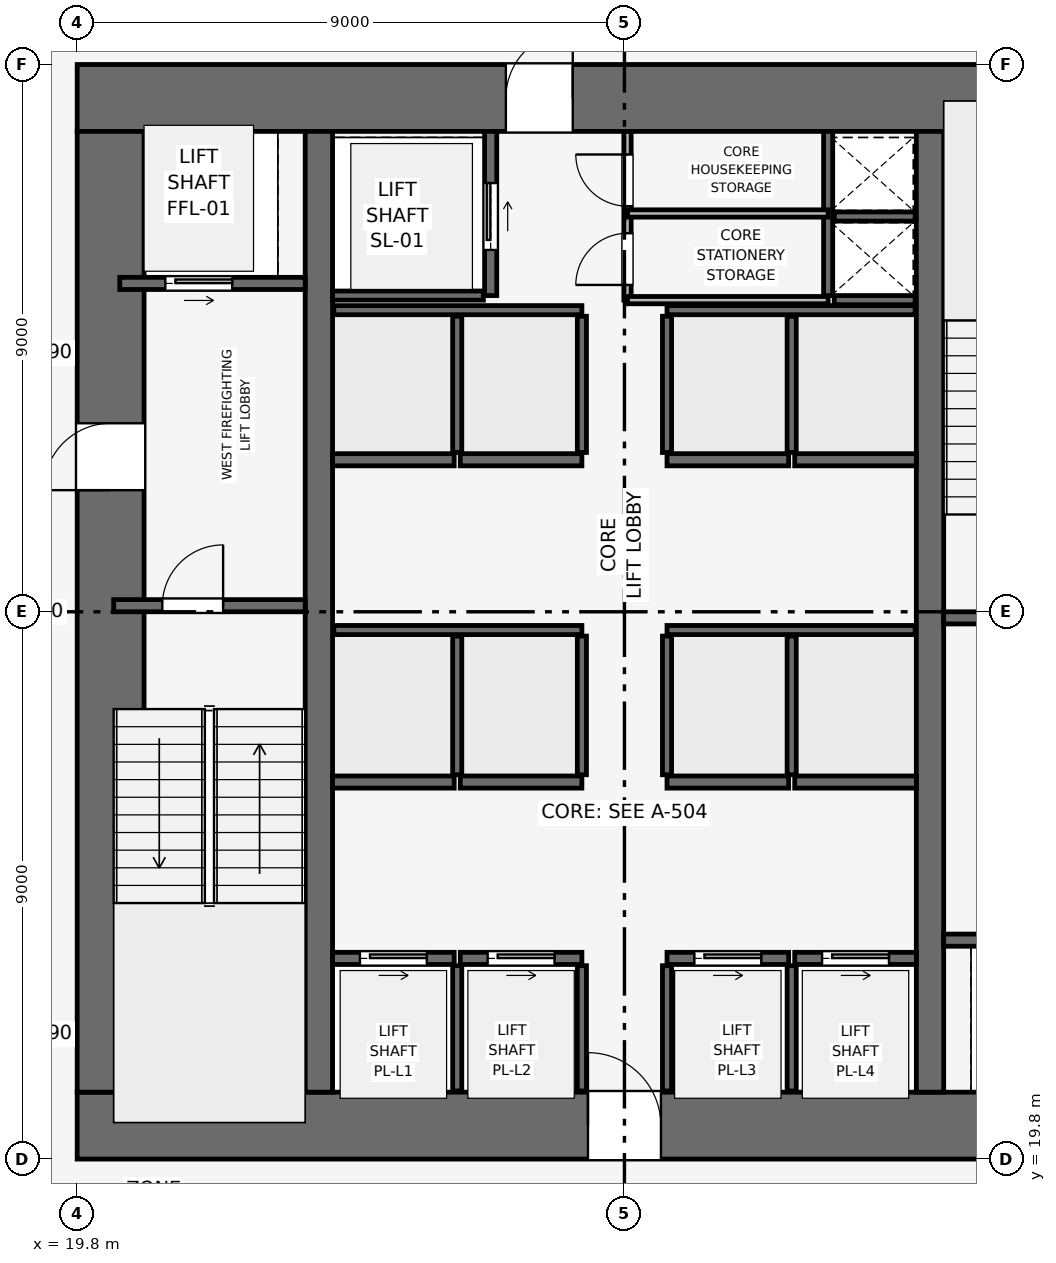
"""IFC4 building model, lengths in metres.
Left out: names, types, materials, properties, quantities, classifications, styles, units other than length and angle.
Written with IfcOpenShell. Run it as: python <this file> out.ifc"""

import sys

from ifc_helpers import new_model, si_unit, direction, frame, frame_2d, origin, place, context, subcontext, project, spatial, rectangle, extrude, element, fill, save


model = new_model("IFC4")
c1 = context("Model", 3, precision=1e-05, world=origin(), true_north=direction((0.0, 1.0)))
c2 = subcontext(c1, "Body", "Model", "MODEL_VIEW")
j1 = project(units=[si_unit("LENGTHUNIT", "METRE"), si_unit("PLANEANGLEUNIT", "RADIAN")], contexts=[c1])
p1 = place(None, origin())
s1 = spatial("IfcSite", under=j1, at=p1, CompositionType="ELEMENT")
p2 = place(p1, origin())
s2 = spatial("IfcBuilding", under=s1, at=p2, CompositionType="ELEMENT")
p3 = place(p2, frame((0.0, 0.0, 33.9)))
s3 = spatial("IfcBuildingStorey", under=s2, at=p3, CompositionType="ELEMENT", Elevation=33.9)
p4 = place(p3, frame((19.8, 20.35, 0.0), z_axis=(0.0, 0.0, 1.0), x_axis=(1.0, 0.0, 0.0)))
e1 = element("IfcWall", 1, at=p4, inside=s3, PredefinedType="SHEAR", context=c2, shape_type="SweptSolid", body=[
    extrude(rectangle(XDim=18.0, YDim=1.1, at=frame_2d((9.0, 0.0))), origin(), (0.0, 0.0, 1.0), 3.9),
])
p5 = place(p4, frame((8.4, 0.0, 0.0)))
e2 = element("IfcOpeningElement", 2, at=p5, cuts=e1, PredefinedType="OPENING", context=c2, shape_type="SweptSolid", body=[
    extrude(rectangle(XDim=1.2, YDim=2.2, at=frame_2d((0.6, 1.1))), frame((0.0, 0.56, 0.0), z_axis=(0.0, -1.0, 0.0), x_axis=(1.0, 0.0, 0.0)), (0.0, 0.0, 1.0), 1.12),
])
p6 = place(p3, frame((19.8, 37.25, 0.0), z_axis=(0.0, 0.0, 1.0), x_axis=(1.0, 0.0, 0.0)))
e3 = element("IfcWall", 3, at=p6, inside=s3, PredefinedType="SHEAR", context=c2, shape_type="SweptSolid", body=[
    extrude(rectangle(XDim=18.0, YDim=1.1, at=frame_2d((9.0, 0.0))), origin(), (0.0, 0.0, 1.0), 3.9),
])
p7 = place(p6, frame((7.05, 0.0, 0.0)))
e4 = element("IfcOpeningElement", 4, at=p7, cuts=e3, PredefinedType="OPENING", context=c2, shape_type="SweptSolid", body=[
    extrude(rectangle(XDim=1.1, YDim=2.15, at=frame_2d((0.55, 1.075))), frame((0.0, 0.56, 0.0), z_axis=(0.0, -1.0, 0.0), x_axis=(1.0, 0.0, 0.0)), (0.0, 0.0, 1.0), 1.12),
])
p8 = place(p3, frame((20.35, 20.9, 0.0), z_axis=(0.0, 0.0, 1.0), x_axis=(0.0, 1.0, 0.0)))
e5 = element("IfcWall", 5, at=p8, inside=s3, PredefinedType="SHEAR", context=c2, shape_type="SweptSolid", body=[
    extrude(rectangle(XDim=15.8, YDim=1.1, at=frame_2d((7.9, 0.0))), origin(), (0.0, 0.0, 1.0), 3.9),
])
p9 = place(p8, frame((9.9, 0.0, 0.0)))
e6 = element("IfcOpeningElement", 6, at=p9, cuts=e5, PredefinedType="OPENING", context=c2, shape_type="SweptSolid", body=[
    extrude(rectangle(XDim=1.1, YDim=2.15, at=frame_2d((0.55, 1.075))), frame((0.0, 0.56, 0.0), z_axis=(0.0, -1.0, 0.0), x_axis=(1.0, 0.0, 0.0)), (0.0, 0.0, 1.0), 1.12),
])
for number, where, z_axis, x_axis in (
    (7, (23.775, 20.9, 0.0), (0.0, 0.0, 1.0), (0.0, 1.0, 0.0)),
    (8, (33.825, 20.9, 0.0), (0.0, 0.0, 1.0), (0.0, 1.0, 0.0)),
):
    element("IfcWall", number, at=place(p3, frame(where, z_axis=z_axis, x_axis=x_axis)), inside=s3, PredefinedType="SHEAR", context=c2, shape_type="SweptSolid", body=[
        extrude(rectangle(XDim=15.8, YDim=0.45, at=frame_2d((7.9, 0.0))), origin(), (0.0, 0.0, 1.0), 3.9),
    ])
p10 = place(p3, frame((20.4, 28.9, 0.0), z_axis=(0.0, 0.0, 1.0), x_axis=(1.0, 0.0, 0.0)))
e9 = element("IfcWall", 9, at=p10, inside=s3, PredefinedType="SHEAR", context=c2, shape_type="SweptSolid", body=[
    extrude(rectangle(XDim=3.15, YDim=0.2, at=frame_2d((1.575, 0.0))), origin(), (0.0, 0.0, 1.0), 3.65),
])
p11 = place(p10, frame((0.8, 0.0, 0.0)))
e10 = element("IfcOpeningElement", 10, at=p11, cuts=e9, PredefinedType="OPENING", context=c2, shape_type="SweptSolid", body=[
    extrude(rectangle(XDim=1.0, YDim=2.1, at=frame_2d((0.5, 1.05))), frame((0.0, 0.11, 0.0), z_axis=(0.0, -1.0, 0.0), x_axis=(1.0, 0.0, 0.0)), (0.0, 0.0, 1.0), 0.22),
])
p12 = place(p3, frame((34.05, 28.7, 0.0), z_axis=(0.0, 0.0, 1.0), x_axis=(1.0, 0.0, 0.0)))
e11 = element("IfcWall", 11, at=p12, inside=s3, PredefinedType="SHEAR", context=c2, shape_type="SweptSolid", body=[
    extrude(rectangle(XDim=3.15, YDim=0.2, at=frame_2d((1.575, 0.0))), origin(), (0.0, 0.0, 1.0), 3.65),
])
p13 = place(p12, frame((0.8, 0.0, 0.0)))
e12 = element("IfcOpeningElement", 12, at=p13, cuts=e11, PredefinedType="OPENING", context=c2, shape_type="SweptSolid", body=[
    extrude(rectangle(XDim=1.0, YDim=2.1, at=frame_2d((0.5, 1.05))), frame((0.0, 0.11, 0.0), z_axis=(0.0, -1.0, 0.0), x_axis=(1.0, 0.0, 0.0)), (0.0, 0.0, 1.0), 0.22),
])
p14 = place(p3, frame((32.15, 34.0, 0.0), z_axis=(0.0, 0.0, 1.0), x_axis=(0.0, 1.0, 0.0)))
e13 = element("IfcWall", 13, at=p14, inside=s3, PredefinedType="SHEAR", context=c2, shape_type="SweptSolid", body=[
    extrude(rectangle(XDim=2.7, YDim=0.15, at=frame_2d((1.35, 0.0))), origin(), (0.0, 0.0, 1.0), 3.65),
])
for number, where, z_axis, x_axis in (
    (14, (32.25, 33.925, 0.0), (0.0, 0.0, 1.0), (1.0, 0.0, 0.0)),
    (15, (32.25, 35.3, 0.0), (0.0, 0.0, 1.0), (1.0, 0.0, 0.0)),
):
    element("IfcWall", number, at=place(p3, frame(where, z_axis=z_axis, x_axis=x_axis)), inside=s3, PredefinedType="SHEAR", context=c2, shape_type="SweptSolid", body=[
        extrude(rectangle(XDim=1.33, YDim=0.15, at=frame_2d((0.665, 0.0))), origin(), (0.0, 0.0, 1.0), 3.65),
    ])
p15 = place(p3, frame((20.5, 34.2, 0.0), z_axis=(0.0, 0.0, 1.0), x_axis=(1.0, 0.0, 0.0)))
e16 = element("IfcWall", 16, at=p15, inside=s3, PredefinedType="SHEAR", context=c2, shape_type="SweptSolid", body=[
    extrude(rectangle(XDim=3.05, YDim=0.2, at=frame_2d((1.525, 0.0))), origin(), (0.0, 0.0, 1.0), 3.65),
])
p16 = place(p15, frame((0.75, 0.0, 0.0)))
e17 = element("IfcOpeningElement", 17, at=p16, cuts=e16, PredefinedType="OPENING", context=c2, shape_type="SweptSolid", body=[
    extrude(rectangle(XDim=1.1, YDim=2.15, at=frame_2d((0.55, 1.075))), frame((0.0, 0.11, 0.0), z_axis=(0.0, -1.0, 0.0), x_axis=(1.0, 0.0, 0.0)), (0.0, 0.0, 1.0), 0.22),
])
p17 = place(p3, frame((34.05, 23.4, 0.0), z_axis=(0.0, 0.0, 1.0), x_axis=(1.0, 0.0, 0.0)))
e18 = element("IfcWall", 18, at=p17, inside=s3, PredefinedType="SHEAR", context=c2, shape_type="SweptSolid", body=[
    extrude(rectangle(XDim=3.05, YDim=0.2, at=frame_2d((1.525, 0.0))), origin(), (0.0, 0.0, 1.0), 3.65),
])
p18 = place(p17, frame((1.2, 0.0, 0.0)))
e19 = element("IfcOpeningElement", 19, at=p18, cuts=e18, PredefinedType="OPENING", context=c2, shape_type="SweptSolid", body=[
    extrude(rectangle(XDim=1.1, YDim=2.15, at=frame_2d((0.55, 1.075))), frame((0.0, 0.11, 0.0), z_axis=(0.0, -1.0, 0.0), x_axis=(1.0, 0.0, 0.0)), (0.0, 0.0, 1.0), 0.22),
])
p19 = place(p3, frame((26.6, 34.0, 0.0), z_axis=(0.0, 0.0, 1.0), x_axis=(0.0, 1.0, 0.0)))
e20 = element("IfcWall", 20, at=p19, inside=s3, PredefinedType="SHEAR", context=c2, shape_type="SweptSolid", body=[
    extrude(rectangle(XDim=2.7, YDim=0.2, at=frame_2d((1.35, 0.0))), origin(), (0.0, 0.0, 1.0), 3.65),
])
p20 = place(p19, frame((0.75, 0.0, 0.0)))
e21 = element("IfcOpeningElement", 21, at=p20, cuts=e20, PredefinedType="OPENING", context=c2, shape_type="SweptSolid", body=[
    extrude(rectangle(XDim=1.1, YDim=2.15, at=frame_2d((0.55, 1.075))), frame((0.0, 0.11, 0.0), z_axis=(0.0, -1.0, 0.0), x_axis=(1.0, 0.0, 0.0)), (0.0, 0.0, 1.0), 0.22),
])
p21 = place(p3, frame((24.0, 34.0, 0.0), z_axis=(0.0, 0.0, 1.0), x_axis=(1.0, 0.0, 0.0)))
e22 = element("IfcWall", 22, at=p21, inside=s3, PredefinedType="SHEAR", context=c2, shape_type="SweptSolid", body=[
    extrude(rectangle(XDim=2.48, YDim=0.15, at=frame_2d((1.24, 0.0))), origin(), (0.0, 0.0, 1.0), 3.65),
])
p22 = place(p3, frame((24.0, 23.1, 0.0), z_axis=(0.0, 0.0, 1.0), x_axis=(1.0, 0.0, 0.0)))
e23 = element("IfcWall", 23, at=p22, inside=s3, PredefinedType="SHEAR", context=c2, shape_type="SweptSolid", body=[
    extrude(rectangle(XDim=2.0, YDim=0.2, at=frame_2d((1.0, 0.0))), origin(), (0.0, 0.0, 1.0), 3.65),
])
p23 = place(p22, frame((0.45, 0.0, 0.0)))
e24 = element("IfcOpeningElement", 24, at=p23, cuts=e23, PredefinedType="OPENING", context=c2, shape_type="SweptSolid", body=[
    extrude(rectangle(XDim=1.1, YDim=2.15, at=frame_2d((0.55, 1.075))), frame((0.0, 0.11, 0.0), z_axis=(0.0, -1.0, 0.0), x_axis=(1.0, 0.0, 0.0)), (0.0, 0.0, 1.0), 0.22),
])
p24 = place(p3, frame((26.1, 23.1, 0.0), z_axis=(0.0, 0.0, 1.0), x_axis=(1.0, 0.0, 0.0)))
e25 = element("IfcWall", 25, at=p24, inside=s3, PredefinedType="SHEAR", context=c2, shape_type="SweptSolid", body=[
    extrude(rectangle(XDim=2.0, YDim=0.2, at=frame_2d((1.0, 0.0))), origin(), (0.0, 0.0, 1.0), 3.65),
])
p25 = place(p24, frame((0.45, 0.0, 0.0)))
e26 = element("IfcOpeningElement", 26, at=p25, cuts=e25, PredefinedType="OPENING", context=c2, shape_type="SweptSolid", body=[
    extrude(rectangle(XDim=1.1, YDim=2.15, at=frame_2d((0.55, 1.075))), frame((0.0, 0.11, 0.0), z_axis=(0.0, -1.0, 0.0), x_axis=(1.0, 0.0, 0.0)), (0.0, 0.0, 1.0), 0.22),
])
p26 = place(p3, frame((29.5, 23.1, 0.0), z_axis=(0.0, 0.0, 1.0), x_axis=(1.0, 0.0, 0.0)))
e27 = element("IfcWall", 27, at=p26, inside=s3, PredefinedType="SHEAR", context=c2, shape_type="SweptSolid", body=[
    extrude(rectangle(XDim=2.0, YDim=0.2, at=frame_2d((1.0, 0.0))), origin(), (0.0, 0.0, 1.0), 3.65),
])
p27 = place(p26, frame((0.45, 0.0, 0.0)))
e28 = element("IfcOpeningElement", 28, at=p27, cuts=e27, PredefinedType="OPENING", context=c2, shape_type="SweptSolid", body=[
    extrude(rectangle(XDim=1.1, YDim=2.15, at=frame_2d((0.55, 1.075))), frame((0.0, 0.11, 0.0), z_axis=(0.0, -1.0, 0.0), x_axis=(1.0, 0.0, 0.0)), (0.0, 0.0, 1.0), 0.22),
])
p28 = place(p3, frame((31.6, 23.1, 0.0), z_axis=(0.0, 0.0, 1.0), x_axis=(1.0, 0.0, 0.0)))
e29 = element("IfcWall", 29, at=p28, inside=s3, PredefinedType="SHEAR", context=c2, shape_type="SweptSolid", body=[
    extrude(rectangle(XDim=2.0, YDim=0.2, at=frame_2d((1.0, 0.0))), origin(), (0.0, 0.0, 1.0), 3.65),
])
p29 = place(p28, frame((0.45, 0.0, 0.0)))
e30 = element("IfcOpeningElement", 30, at=p29, cuts=e29, PredefinedType="OPENING", context=c2, shape_type="SweptSolid", body=[
    extrude(rectangle(XDim=1.1, YDim=2.15, at=frame_2d((0.55, 1.075))), frame((0.0, 0.11, 0.0), z_axis=(0.0, -1.0, 0.0), x_axis=(1.0, 0.0, 0.0)), (0.0, 0.0, 1.0), 0.22),
])
for number, where, z_axis, x_axis in (
    (31, (24.0, 26.0, 0.0), (0.0, 0.0, 1.0), (1.0, 0.0, 0.0)),
    (32, (26.1, 26.0, 0.0), (0.0, 0.0, 1.0), (1.0, 0.0, 0.0)),
    (33, (29.5, 26.0, 0.0), (0.0, 0.0, 1.0), (1.0, 0.0, 0.0)),
    (34, (31.6, 26.0, 0.0), (0.0, 0.0, 1.0), (1.0, 0.0, 0.0)),
    (35, (24.0, 31.3, 0.0), (0.0, 0.0, 1.0), (1.0, 0.0, 0.0)),
    (36, (26.1, 31.3, 0.0), (0.0, 0.0, 1.0), (1.0, 0.0, 0.0)),
    (37, (29.5, 31.3, 0.0), (0.0, 0.0, 1.0), (1.0, 0.0, 0.0)),
    (38, (31.6, 31.3, 0.0), (0.0, 0.0, 1.0), (1.0, 0.0, 0.0)),
):
    element("IfcWall", number, at=place(p3, frame(where, z_axis=z_axis, x_axis=x_axis)), inside=s3, PredefinedType="SHEAR", context=c2, shape_type="SweptSolid", body=[
        extrude(rectangle(XDim=2.0, YDim=0.2, at=frame_2d((1.0, 0.0))), origin(), (0.0, 0.0, 1.0), 3.65),
    ])
for number, where, z_axis, x_axis in (
    (39, (26.05, 20.92, 0.0), (0.0, 0.0, 1.0), (0.0, 1.0, 0.0)),
    (40, (28.1, 20.92, 0.0), (0.0, 0.0, 1.0), (0.0, 1.0, 0.0)),
    (41, (29.5, 20.92, 0.0), (0.0, 0.0, 1.0), (0.0, 1.0, 0.0)),
    (42, (31.55, 20.92, 0.0), (0.0, 0.0, 1.0), (0.0, 1.0, 0.0)),
):
    element("IfcWall", number, at=place(p3, frame(where, z_axis=z_axis, x_axis=x_axis)), inside=s3, PredefinedType="SHEAR", context=c2, shape_type="SweptSolid", body=[
        extrude(rectangle(XDim=2.06, YDim=0.15, at=frame_2d((1.03, 0.0))), origin(), (0.0, 0.0, 1.0), 3.65),
    ])
for number, where, z_axis, x_axis in (
    (43, (24.02, 28.5, 0.0), (0.0, 0.0, 1.0), (1.0, 0.0, 0.0)),
    (44, (29.5, 28.5, 0.0), (0.0, 0.0, 1.0), (1.0, 0.0, 0.0)),
):
    element("IfcWall", number, at=place(p3, frame(where, z_axis=z_axis, x_axis=x_axis)), inside=s3, PredefinedType="SHEAR", context=c2, shape_type="SweptSolid", body=[
        extrude(rectangle(XDim=4.08, YDim=0.15, at=frame_2d((2.04, 0.0))), origin(), (0.0, 0.0, 1.0), 3.65),
    ])
for number, where, z_axis, x_axis in (
    (45, (26.05, 26.12, 0.0), (0.0, 0.0, 1.0), (0.0, 1.0, 0.0)),
    (46, (28.1, 26.12, 0.0), (0.0, 0.0, 1.0), (0.0, 1.0, 0.0)),
    (47, (29.5, 26.12, 0.0), (0.0, 0.0, 1.0), (0.0, 1.0, 0.0)),
    (48, (31.55, 26.12, 0.0), (0.0, 0.0, 1.0), (0.0, 1.0, 0.0)),
):
    element("IfcWall", number, at=place(p3, frame(where, z_axis=z_axis, x_axis=x_axis)), inside=s3, PredefinedType="SHEAR", context=c2, shape_type="SweptSolid", body=[
        extrude(rectangle(XDim=2.28, YDim=0.15, at=frame_2d((1.14, 0.0))), origin(), (0.0, 0.0, 1.0), 3.65),
    ])
for number, where, z_axis, x_axis in (
    (49, (24.02, 33.76, 0.0), (0.0, 0.0, 1.0), (1.0, 0.0, 0.0)),
    (50, (29.5, 33.76, 0.0), (0.0, 0.0, 1.0), (1.0, 0.0, 0.0)),
):
    element("IfcWall", number, at=place(p3, frame(where, z_axis=z_axis, x_axis=x_axis)), inside=s3, PredefinedType="SHEAR", context=c2, shape_type="SweptSolid", body=[
        extrude(rectangle(XDim=4.08, YDim=0.15, at=frame_2d((2.04, 0.0))), origin(), (0.0, 0.0, 1.0), 3.65),
    ])
for number, where, z_axis, x_axis in (
    (51, (26.05, 31.42, 0.0), (0.0, 0.0, 1.0), (0.0, 1.0, 0.0)),
    (52, (28.1, 31.42, 0.0), (0.0, 0.0, 1.0), (0.0, 1.0, 0.0)),
    (53, (29.5, 31.42, 0.0), (0.0, 0.0, 1.0), (0.0, 1.0, 0.0)),
    (54, (31.55, 31.42, 0.0), (0.0, 0.0, 1.0), (0.0, 1.0, 0.0)),
):
    element("IfcWall", number, at=place(p3, frame(where, z_axis=z_axis, x_axis=x_axis)), inside=s3, PredefinedType="SHEAR", context=c2, shape_type="SweptSolid", body=[
        extrude(rectangle(XDim=2.24, YDim=0.15, at=frame_2d((1.12, 0.0))), origin(), (0.0, 0.0, 1.0), 3.65),
    ])
p30 = place(p3, frame((28.85, 33.925, 0.0), z_axis=(0.0, 0.0, 1.0), x_axis=(0.0, 1.0, 0.0)))
e55 = element("IfcWall", 55, at=p30, inside=s3, PredefinedType="PARTITIONING", context=c2, shape_type="SweptSolid", body=[
    extrude(rectangle(XDim=2.775, YDim=0.12, at=frame_2d((1.387, 0.0))), origin(), (0.0, 0.0, 1.0), 3.65),
])
p31 = place(p30, frame((0.25, 0.0, 0.0)))
e56 = element("IfcOpeningElement", 56, at=p31, cuts=e55, PredefinedType="OPENING", context=c2, shape_type="SweptSolid", body=[
    extrude(rectangle(XDim=0.85, YDim=2.1, at=frame_2d((0.425, 1.05))), frame((0.0, 0.07, 0.0), z_axis=(0.0, -1.0, 0.0), x_axis=(1.0, 0.0, 0.0)), (0.0, 0.0, 1.0), 0.14),
])
p32 = place(p30, frame((1.545, 0.0, 0.0)))
e57 = element("IfcOpeningElement", 57, at=p32, cuts=e55, PredefinedType="OPENING", context=c2, shape_type="SweptSolid", body=[
    extrude(rectangle(XDim=0.85, YDim=2.1, at=frame_2d((0.425, 1.05))), frame((0.0, 0.07, 0.0), z_axis=(0.0, -1.0, 0.0), x_axis=(1.0, 0.0, 0.0)), (0.0, 0.0, 1.0), 0.14),
])
for number, where, z_axis, x_axis in (
    (58, (28.85, 35.35, 0.0), (0.0, 0.0, 1.0), (1.0, 0.0, 0.0)),
    (59, (28.85, 33.925, 0.0), (0.0, 0.0, 1.0), (1.0, 0.0, 0.0)),
):
    element("IfcWall", number, at=place(p3, frame(where, z_axis=z_axis, x_axis=x_axis)), inside=s3, PredefinedType="PARTITIONING", context=c2, shape_type="SweptSolid", body=[
        extrude(rectangle(XDim=3.3, YDim=0.12, at=frame_2d((1.65, 0.0))), origin(), (0.0, 0.0, 1.0), 3.65),
    ])
p33 = place(p11, origin())
e60 = element("IfcDoor", 60, at=p33, inside=s3, OperationType="SINGLE_SWING_RIGHT", PredefinedType="DOOR", context=c2, shape_type="SweptSolid", body=[
    extrude(rectangle(XDim=1.0, YDim=2.1, at=frame_2d((0.5, 1.05))), frame((0.0, 0.025, 0.0), z_axis=(0.0, -1.0, 0.0), x_axis=(1.0, 0.0, 0.0)), (0.0, 0.0, 1.0), 0.05),
])
fill(e10, e60)
p34 = place(p16, origin())
e61 = element("IfcDoor", 61, at=p34, inside=s3, OperationType="SLIDING_TO_RIGHT", PredefinedType="DOOR", context=c2, shape_type="SweptSolid", body=[
    extrude(rectangle(XDim=1.1, YDim=2.15, at=frame_2d((0.55, 1.075))), frame((0.0, 0.025, 0.0), z_axis=(0.0, -1.0, 0.0), x_axis=(1.0, 0.0, 0.0)), (0.0, 0.0, 1.0), 0.05),
])
fill(e17, e61)
p35 = place(p20, origin())
e62 = element("IfcDoor", 62, at=p35, inside=s3, OperationType="SLIDING_TO_RIGHT", PredefinedType="DOOR", context=c2, shape_type="SweptSolid", body=[
    extrude(rectangle(XDim=1.1, YDim=2.15, at=frame_2d((0.55, 1.075))), frame((0.0, 0.025, 0.0), z_axis=(0.0, -1.0, 0.0), x_axis=(1.0, 0.0, 0.0)), (0.0, 0.0, 1.0), 0.05),
])
fill(e21, e62)
p36 = place(p23, origin())
e63 = element("IfcDoor", 63, at=p36, inside=s3, OperationType="SLIDING_TO_RIGHT", PredefinedType="DOOR", context=c2, shape_type="SweptSolid", body=[
    extrude(rectangle(XDim=1.1, YDim=2.15, at=frame_2d((0.55, 1.075))), frame((0.0, 0.025, 0.0), z_axis=(0.0, -1.0, 0.0), x_axis=(1.0, 0.0, 0.0)), (0.0, 0.0, 1.0), 0.05),
])
fill(e24, e63)
p37 = place(p25, origin())
e64 = element("IfcDoor", 64, at=p37, inside=s3, OperationType="SLIDING_TO_RIGHT", PredefinedType="DOOR", context=c2, shape_type="SweptSolid", body=[
    extrude(rectangle(XDim=1.1, YDim=2.15, at=frame_2d((0.55, 1.075))), frame((0.0, 0.025, 0.0), z_axis=(0.0, -1.0, 0.0), x_axis=(1.0, 0.0, 0.0)), (0.0, 0.0, 1.0), 0.05),
])
fill(e26, e64)
p38 = place(p27, origin())
e65 = element("IfcDoor", 65, at=p38, inside=s3, OperationType="SLIDING_TO_RIGHT", PredefinedType="DOOR", context=c2, shape_type="SweptSolid", body=[
    extrude(rectangle(XDim=1.1, YDim=2.15, at=frame_2d((0.55, 1.075))), frame((0.0, 0.025, 0.0), z_axis=(0.0, -1.0, 0.0), x_axis=(1.0, 0.0, 0.0)), (0.0, 0.0, 1.0), 0.05),
])
fill(e28, e65)
p39 = place(p29, origin())
e66 = element("IfcDoor", 66, at=p39, inside=s3, OperationType="SLIDING_TO_RIGHT", PredefinedType="DOOR", context=c2, shape_type="SweptSolid", body=[
    extrude(rectangle(XDim=1.1, YDim=2.15, at=frame_2d((0.55, 1.075))), frame((0.0, 0.025, 0.0), z_axis=(0.0, -1.0, 0.0), x_axis=(1.0, 0.0, 0.0)), (0.0, 0.0, 1.0), 0.05),
])
fill(e30, e66)
p40 = place(p31, origin())
e67 = element("IfcDoor", 67, at=p40, inside=s3, OperationType="SINGLE_SWING_LEFT", PredefinedType="DOOR", context=c2, shape_type="SweptSolid", body=[
    extrude(rectangle(XDim=0.85, YDim=2.1, at=frame_2d((0.425, 1.05))), frame((0.0, 0.025, 0.0), z_axis=(0.0, -1.0, 0.0), x_axis=(1.0, 0.0, 0.0)), (0.0, 0.0, 1.0), 0.05),
])
fill(e56, e67)
p41 = place(p32, origin())
e68 = element("IfcDoor", 68, at=p41, inside=s3, OperationType="SINGLE_SWING_RIGHT", PredefinedType="DOOR", context=c2, shape_type="SweptSolid", body=[
    extrude(rectangle(XDim=0.85, YDim=2.1, at=frame_2d((0.425, 1.05))), frame((0.0, 0.025, 0.0), z_axis=(0.0, -1.0, 0.0), x_axis=(1.0, 0.0, 0.0)), (0.0, 0.0, 1.0), 0.05),
])
fill(e57, e68)
p42 = place(p9, origin())
e69 = element("IfcDoor", 69, at=p42, inside=s3, OperationType="SINGLE_SWING_LEFT", PredefinedType="DOOR", context=c2, shape_type="SweptSolid", body=[
    extrude(rectangle(XDim=1.1, YDim=2.15, at=frame_2d((0.55, 1.075))), frame((0.0, 0.025, 0.0), z_axis=(0.0, -1.0, 0.0), x_axis=(1.0, 0.0, 0.0)), (0.0, 0.0, 1.0), 0.05),
])
fill(e6, e69)
p43 = place(p5, origin())
e70 = element("IfcDoor", 70, at=p43, inside=s3, OperationType="SINGLE_SWING_LEFT", PredefinedType="DOOR", context=c2, shape_type="SweptSolid", body=[
    extrude(rectangle(XDim=1.2, YDim=2.2, at=frame_2d((0.6, 1.1))), frame((0.0, 0.025, 0.0), z_axis=(0.0, -1.0, 0.0), x_axis=(1.0, 0.0, 0.0)), (0.0, 0.0, 1.0), 0.05),
])
fill(e2, e70)
p44 = place(p7, origin())
e71 = element("IfcDoor", 71, at=p44, inside=s3, OperationType="SINGLE_SWING_RIGHT", PredefinedType="DOOR", context=c2, shape_type="SweptSolid", body=[
    extrude(rectangle(XDim=1.1, YDim=2.15, at=frame_2d((0.55, 1.075))), frame((0.0, 0.025, 0.0), z_axis=(0.0, -1.0, 0.0), x_axis=(1.0, 0.0, 0.0)), (0.0, 0.0, 1.0), 0.05),
])
fill(e4, e71)
save(model, sys.argv[1])
